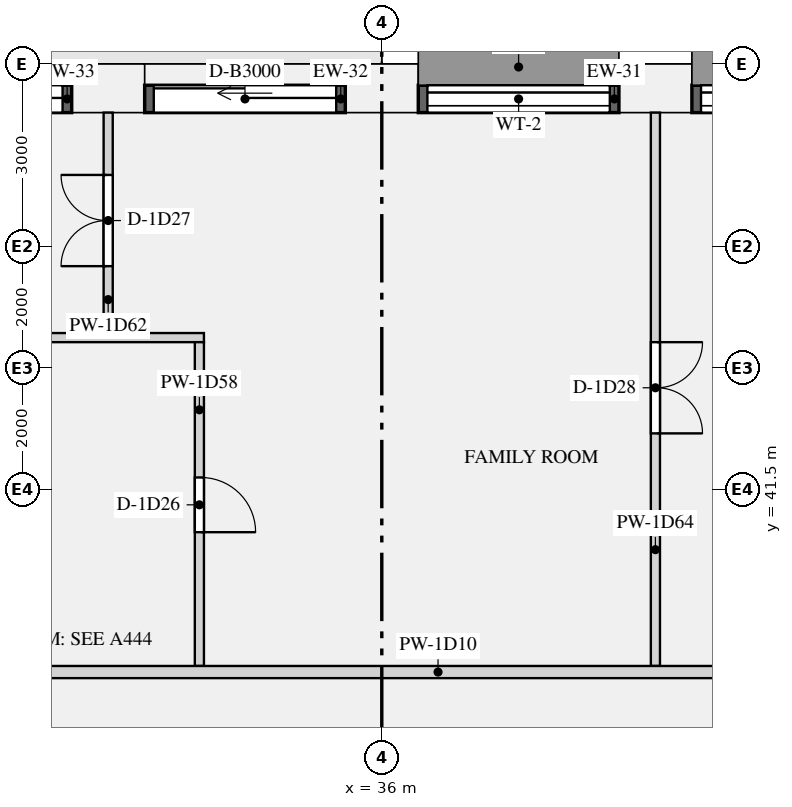
"""IFC4 building model, lengths in metres.
Left out: names, types, materials, properties, quantities, classifications, styles, units other than length and angle.
Written with IfcOpenShell. Run it as: python <this file> out.ifc"""

import sys

from ifc_helpers import new_model, si_unit, direction, frame, frame_2d, origin, origin_2d, place, context, subcontext, project, spatial, rectangle, extrude, element, fill, save


model = new_model("IFC4")
c1 = context("Model", 3, precision=1e-05, world=origin(), true_north=direction((0.0, 1.0)))
c2 = subcontext(c1, "Body", "Model", "MODEL_VIEW")
j1 = project(units=[si_unit("LENGTHUNIT", "METRE"), si_unit("PLANEANGLEUNIT", "RADIAN")], contexts=[c1])
p1 = place(None, origin())
s1 = spatial("IfcSite", under=j1, at=p1, CompositionType="ELEMENT")
p2 = place(p1, origin())
s2 = spatial("IfcBuilding", under=s1, at=p2, CompositionType="ELEMENT")
p3 = place(p2, frame((0.0, 0.0, 47.85)))
s3 = spatial("IfcBuildingStorey", under=s2, at=p3, CompositionType="ELEMENT", Elevation=47.85)
for number, where, z_axis, x_axis in (
    (1, (40.5, 48.1, 0.0), (0.0, 0.0, 1.0), (-1.0, 0.0, 0.0)),
    (2, (36.0, 48.1, 0.0), (0.0, 0.0, 1.0), (-1.0, 0.0, 0.0)),
    (3, (31.5, 48.1, 0.0), (0.0, 0.0, 1.0), (-1.0, 0.0, 0.0)),
):
    element("IfcColumn", number, at=place(p3, frame(where, z_axis=z_axis, x_axis=x_axis)), inside=s3, PredefinedType="USERDEFINED", context=c2, shape_type="SweptSolid", body=[
        extrude(rectangle(XDim=1.2, YDim=0.8, at=origin_2d()), origin(), (0.0, 0.0, 1.0), 3.15),
    ])
p4 = place(p3, frame((44.4, 47.925, 0.9), z_axis=(0.0, 0.0, 1.0), x_axis=(-1.0, 0.0, 0.0)))
e4 = element("IfcWall", 4, at=p4, inside=s3, PredefinedType="SOLIDWALL", context=c2, shape_type="SweptSolid", body=[
    extrude(rectangle(XDim=3.3, YDim=0.45, at=frame_2d((1.65, 0.0))), origin(), (0.0, 0.0, 1.0), 1.93),
])
p5 = place(p4, frame((0.15, 0.0, 0.15)))
e5 = element("IfcOpeningElement", 5, at=p5, cuts=e4, PredefinedType="OPENING", context=c2, shape_type="SweptSolid", body=[
    extrude(rectangle(XDim=3.0, YDim=1.5, at=frame_2d((1.5, 0.75))), frame((0.0, 0.235, 0.0), z_axis=(0.0, -1.0, 0.0), x_axis=(1.0, 0.0, 0.0)), (0.0, 0.0, 1.0), 0.47),
])
p6 = place(p3, frame((39.9, 47.925, 0.9), z_axis=(0.0, 0.0, 1.0), x_axis=(-1.0, 0.0, 0.0)))
e6 = element("IfcWall", 6, at=p6, inside=s3, PredefinedType="SOLIDWALL", context=c2, shape_type="SweptSolid", body=[
    extrude(rectangle(XDim=3.3, YDim=0.45, at=frame_2d((1.65, 0.0))), origin(), (0.0, 0.0, 1.0), 1.93),
])
p7 = place(p6, frame((0.15, 0.0, 0.15)))
e7 = element("IfcOpeningElement", 7, at=p7, cuts=e6, PredefinedType="OPENING", context=c2, shape_type="SweptSolid", body=[
    extrude(rectangle(XDim=3.0, YDim=1.5, at=frame_2d((1.5, 0.75))), frame((0.0, 0.235, 0.0), z_axis=(0.0, -1.0, 0.0), x_axis=(1.0, 0.0, 0.0)), (0.0, 0.0, 1.0), 0.47),
])
p8 = place(p3, frame((35.4, 47.925, 0.0), z_axis=(0.0, 0.0, 1.0), x_axis=(-1.0, 0.0, 0.0)))
e8 = element("IfcWall", 8, at=p8, inside=s3, PredefinedType="SOLIDWALL", context=c2, shape_type="SweptSolid", body=[
    extrude(rectangle(XDim=3.3, YDim=0.45, at=frame_2d((1.65, 0.0))), origin(), (0.0, 0.0, 1.0), 2.83),
])
p9 = place(p8, frame((0.15, 0.0, 0.0)))
e9 = element("IfcOpeningElement", 9, at=p9, cuts=e8, PredefinedType="OPENING", context=c2, shape_type="SweptSolid", body=[
    extrude(rectangle(XDim=3.0, YDim=2.3, at=frame_2d((1.5, 1.15))), frame((0.0, 0.235, 0.0), z_axis=(0.0, -1.0, 0.0), x_axis=(1.0, 0.0, 0.0)), (0.0, 0.0, 1.0), 0.47),
])
p10 = place(p3, frame((30.9, 47.925, 0.0), z_axis=(0.0, 0.0, 1.0), x_axis=(-1.0, 0.0, 0.0)))
e10 = element("IfcWall", 10, at=p10, inside=s3, PredefinedType="SOLIDWALL", context=c2, shape_type="SweptSolid", body=[
    extrude(rectangle(XDim=3.3, YDim=0.45, at=frame_2d((1.65, 0.0))), origin(), (0.0, 0.0, 1.0), 2.83),
])
p11 = place(p10, frame((0.15, 0.0, 0.0)))
e11 = element("IfcOpeningElement", 11, at=p11, cuts=e10, PredefinedType="OPENING", context=c2, shape_type="SweptSolid", body=[
    extrude(rectangle(XDim=3.0, YDim=2.3, at=frame_2d((1.5, 1.15))), frame((0.0, 0.235, 0.0), z_axis=(0.0, -1.0, 0.0), x_axis=(1.0, 0.0, 0.0)), (0.0, 0.0, 1.0), 0.47),
])
p12 = place(p3, frame((23.9, 38.5, 0.0), z_axis=(0.0, 0.0, 1.0), x_axis=(1.0, 0.0, 0.0)))
e12 = element("IfcWall", 12, at=p12, inside=s3, PredefinedType="PARTITIONING", context=c2, shape_type="SweptSolid", body=[
    extrude(rectangle(XDim=24.2, YDim=0.2, at=frame_2d((12.1, 0.0))), origin(), (0.0, 0.0, 1.0), 2.83),
])
p13 = place(p12, frame((3.55, 0.0, 0.0)))
e13 = element("IfcOpeningElement", 13, at=p13, cuts=e12, PredefinedType="OPENING", context=c2, shape_type="SweptSolid", body=[
    extrude(rectangle(XDim=1.1, YDim=2.1, at=frame_2d((0.55, 1.05))), frame((0.0, 0.11, 0.0), z_axis=(0.0, -1.0, 0.0), x_axis=(1.0, 0.0, 0.0)), (0.0, 0.0, 1.0), 0.22),
])
p14 = place(p12, frame((21.4, 0.0, 0.0)))
e14 = element("IfcOpeningElement", 14, at=p14, cuts=e12, PredefinedType="OPENING", context=c2, shape_type="SweptSolid", body=[
    extrude(rectangle(XDim=1.1, YDim=2.1, at=frame_2d((0.55, 1.05))), frame((0.0, 0.11, 0.0), z_axis=(0.0, -1.0, 0.0), x_axis=(1.0, 0.0, 0.0)), (0.0, 0.0, 1.0), 0.22),
])
p15 = place(p3, frame((5.3, 44.0, 0.0), z_axis=(0.0, 0.0, 1.0), x_axis=(1.0, 0.0, 0.0)))
e15 = element("IfcWall", 15, at=p15, inside=s3, PredefinedType="PARTITIONING", context=c2, shape_type="SweptSolid", body=[
    extrude(rectangle(XDim=27.775, YDim=0.15, at=frame_2d((13.887, 0.0))), origin(), (0.0, 0.0, 1.0), 2.83),
])
p16 = place(p15, frame((14.5, 0.0, 0.0)))
e16 = element("IfcOpeningElement", 16, at=p16, cuts=e15, PredefinedType="OPENING", context=c2, shape_type="SweptSolid", body=[
    extrude(rectangle(XDim=0.9, YDim=2.1, at=frame_2d((0.45, 1.05))), frame((0.0, 0.085, 0.0), z_axis=(0.0, -1.0, 0.0), x_axis=(1.0, 0.0, 0.0)), (0.0, 0.0, 1.0), 0.17),
])
p17 = place(p15, frame((19.0, 0.0, 0.0)))
e17 = element("IfcOpeningElement", 17, at=p17, cuts=e15, PredefinedType="OPENING", context=c2, shape_type="SweptSolid", body=[
    extrude(rectangle(XDim=0.9, YDim=2.1, at=frame_2d((0.45, 1.05))), frame((0.0, 0.085, 0.0), z_axis=(0.0, -1.0, 0.0), x_axis=(1.0, 0.0, 0.0)), (0.0, 0.0, 1.0), 0.17),
])
p18 = place(p15, frame((9.35, 0.0, 0.0)))
e18 = element("IfcOpeningElement", 18, at=p18, cuts=e15, PredefinedType="OPENING", context=c2, shape_type="SweptSolid", body=[
    extrude(rectangle(XDim=0.9, YDim=2.1, at=frame_2d((0.45, 1.05))), frame((0.0, 0.085, 0.0), z_axis=(0.0, -1.0, 0.0), x_axis=(1.0, 0.0, 0.0)), (0.0, 0.0, 1.0), 0.17),
])
p19 = place(p15, frame((23.5, 0.0, 0.0)))
e19 = element("IfcOpeningElement", 19, at=p19, cuts=e15, PredefinedType="OPENING", context=c2, shape_type="SweptSolid", body=[
    extrude(rectangle(XDim=0.9, YDim=2.1, at=frame_2d((0.45, 1.05))), frame((0.0, 0.085, 0.0), z_axis=(0.0, -1.0, 0.0), x_axis=(1.0, 0.0, 0.0)), (0.0, 0.0, 1.0), 0.17),
])
p20 = place(p3, frame((33.0, 38.6, 0.0), z_axis=(0.0, 0.0, 1.0), x_axis=(0.0, 1.0, 0.0)))
e20 = element("IfcWall", 20, at=p20, inside=s3, PredefinedType="PARTITIONING", context=c2, shape_type="SweptSolid", body=[
    extrude(rectangle(XDim=5.325, YDim=0.15, at=frame_2d((2.663, 0.0))), origin(), (0.0, 0.0, 1.0), 2.83),
])
p21 = place(p20, frame((2.2, 0.0, 0.0)))
e21 = element("IfcOpeningElement", 21, at=p21, cuts=e20, PredefinedType="OPENING", context=c2, shape_type="SweptSolid", body=[
    extrude(rectangle(XDim=0.9, YDim=2.1, at=frame_2d((0.45, 1.05))), frame((0.0, 0.085, 0.0), z_axis=(0.0, -1.0, 0.0), x_axis=(1.0, 0.0, 0.0)), (0.0, 0.0, 1.0), 0.17),
])
p22 = place(p3, frame((31.5, 44.075, 0.0), z_axis=(0.0, 0.0, 1.0), x_axis=(0.0, 1.0, 0.0)))
e22 = element("IfcWall", 22, at=p22, inside=s3, PredefinedType="PARTITIONING", context=c2, shape_type="SweptSolid", body=[
    extrude(rectangle(XDim=3.625, YDim=0.15, at=frame_2d((1.812, 0.0))), origin(), (0.0, 0.0, 1.0), 2.83),
])
p23 = place(p22, frame((1.1, 0.0, 0.0)))
e23 = element("IfcOpeningElement", 23, at=p23, cuts=e22, PredefinedType="OPENING", context=c2, shape_type="SweptSolid", body=[
    extrude(rectangle(XDim=1.5, YDim=2.1, at=frame_2d((0.75, 1.05))), frame((0.0, 0.085, 0.0), z_axis=(0.0, -1.0, 0.0), x_axis=(1.0, 0.0, 0.0)), (0.0, 0.0, 1.0), 0.17),
])
p24 = place(p3, frame((40.5, 38.6, 0.0), z_axis=(0.0, 0.0, 1.0), x_axis=(0.0, 1.0, 0.0)))
e24 = element("IfcWall", 24, at=p24, inside=s3, PredefinedType="PARTITIONING", context=c2, shape_type="SweptSolid", body=[
    extrude(rectangle(XDim=9.1, YDim=0.15, at=frame_2d((4.55, 0.0))), origin(), (0.0, 0.0, 1.0), 2.83),
])
p25 = place(p24, frame((3.825, 0.0, 0.0)))
e25 = element("IfcOpeningElement", 25, at=p25, cuts=e24, PredefinedType="OPENING", context=c2, shape_type="SweptSolid", body=[
    extrude(rectangle(XDim=1.5, YDim=2.1, at=frame_2d((0.75, 1.05))), frame((0.0, 0.085, 0.0), z_axis=(0.0, -1.0, 0.0), x_axis=(1.0, 0.0, 0.0)), (0.0, 0.0, 1.0), 0.17),
])
p26 = place(p5, origin())
e26 = element("IfcWindow", 26, at=p26, inside=s3, PartitioningType="SINGLE_PANEL", PredefinedType="WINDOW", context=c2, shape_type="SweptSolid", body=[
    extrude(rectangle(XDim=3.0, YDim=1.5, at=frame_2d((1.5, 0.75))), frame((0.0, -0.065, 0.0), z_axis=(0.0, -1.0, 0.0), x_axis=(1.0, 0.0, 0.0)), (0.0, 0.0, 1.0), 0.06),
])
fill(e5, e26)
p27 = place(p7, origin())
e27 = element("IfcWindow", 27, at=p27, inside=s3, PartitioningType="SINGLE_PANEL", PredefinedType="WINDOW", context=c2, shape_type="SweptSolid", body=[
    extrude(rectangle(XDim=3.0, YDim=1.5, at=frame_2d((1.5, 0.75))), frame((0.0, -0.065, 0.0), z_axis=(0.0, -1.0, 0.0), x_axis=(1.0, 0.0, 0.0)), (0.0, 0.0, 1.0), 0.06),
])
fill(e7, e27)
p28 = place(p9, origin())
e28 = element("IfcDoor", 28, at=p28, inside=s3, OperationType="SLIDING_TO_LEFT", PredefinedType="DOOR", context=c2, shape_type="SweptSolid", body=[
    extrude(rectangle(XDim=3.0, YDim=2.3, at=frame_2d((1.5, 1.15))), frame((0.0, -0.07, 0.0), z_axis=(0.0, -1.0, 0.0), x_axis=(1.0, 0.0, 0.0)), (0.0, 0.0, 1.0), 0.05),
])
fill(e9, e28)
p29 = place(p11, origin())
e29 = element("IfcDoor", 29, at=p29, inside=s3, OperationType="SLIDING_TO_LEFT", PredefinedType="DOOR", context=c2, shape_type="SweptSolid", body=[
    extrude(rectangle(XDim=3.0, YDim=2.3, at=frame_2d((1.5, 1.15))), frame((0.0, -0.07, 0.0), z_axis=(0.0, -1.0, 0.0), x_axis=(1.0, 0.0, 0.0)), (0.0, 0.0, 1.0), 0.05),
])
fill(e11, e29)
p30 = place(p21, frame((0.9, 0.0, 0.0), z_axis=(0.0, 0.0, 1.0), x_axis=(-1.0, 0.0, 0.0)))
e30 = element("IfcDoor", 30, at=p30, inside=s3, OperationType="SINGLE_SWING_RIGHT", PredefinedType="DOOR", context=c2, shape_type="SweptSolid", body=[
    extrude(rectangle(XDim=0.9, YDim=2.1, at=frame_2d((0.45, 1.05))), frame((0.0, 0.025, 0.0), z_axis=(0.0, -1.0, 0.0), x_axis=(1.0, 0.0, 0.0)), (0.0, 0.0, 1.0), 0.05),
])
fill(e21, e30)
p31 = place(p23, origin())
e31 = element("IfcDoor", 31, at=p31, inside=s3, OperationType="DOUBLE_DOOR_SINGLE_SWING", PredefinedType="DOOR", context=c2, shape_type="SweptSolid", body=[
    extrude(rectangle(XDim=1.5, YDim=2.1, at=frame_2d((0.75, 1.05))), frame((0.0, 0.025, 0.0), z_axis=(0.0, -1.0, 0.0), x_axis=(1.0, 0.0, 0.0)), (0.0, 0.0, 1.0), 0.05),
])
fill(e23, e31)
p32 = place(p25, frame((1.5, 0.0, 0.0), z_axis=(0.0, 0.0, 1.0), x_axis=(-1.0, 0.0, 0.0)))
e32 = element("IfcDoor", 32, at=p32, inside=s3, OperationType="DOUBLE_DOOR_SINGLE_SWING", PredefinedType="DOOR", context=c2, shape_type="SweptSolid", body=[
    extrude(rectangle(XDim=1.5, YDim=2.1, at=frame_2d((0.75, 1.05))), frame((0.0, 0.025, 0.0), z_axis=(0.0, -1.0, 0.0), x_axis=(1.0, 0.0, 0.0)), (0.0, 0.0, 1.0), 0.05),
])
fill(e25, e32)
save(model, sys.argv[1])
